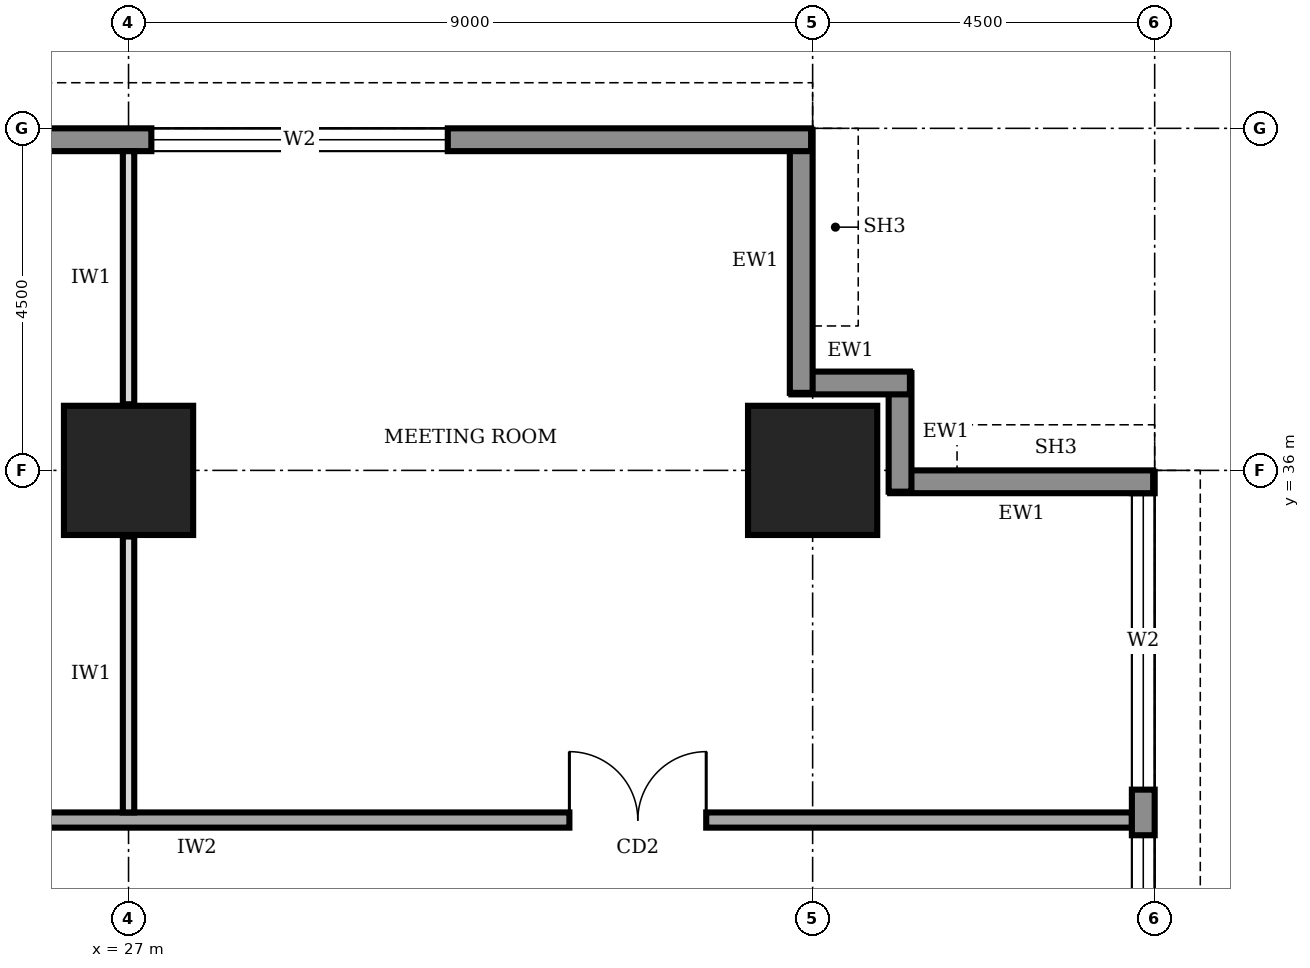
"""IFC4 building model, lengths in metres.
Left out: names, types, materials, properties, quantities, classifications, styles, units other than length and angle.
Written with IfcOpenShell. Run it as: python <this file> out.ifc"""

import sys

from ifc_helpers import new_model, si_unit, direction, frame, frame_2d, origin, origin_2d, place, context, subcontext, project, spatial, rectangle, extrude, element, fill, save


model = new_model("IFC4")
c1 = context("Model", 3, precision=1e-05, world=origin(), true_north=direction((0.0, 1.0)))
c2 = subcontext(c1, "Body", "Model", "MODEL_VIEW")
j1 = project(units=[si_unit("LENGTHUNIT", "METRE"), si_unit("PLANEANGLEUNIT", "RADIAN")], contexts=[c1])
p1 = place(None, origin())
s1 = spatial("IfcSite", under=j1, at=p1, CompositionType="ELEMENT")
p2 = place(p1, origin())
s2 = spatial("IfcBuilding", under=s1, at=p2, CompositionType="ELEMENT")
p3 = place(p2, frame((0.0, 0.0, 145.0)))
s3 = spatial("IfcBuildingStorey", under=s2, at=p3, CompositionType="ELEMENT", Elevation=145.0)
for number, where, z_axis, x_axis in (
    (1, (27.0, 36.0, 0.0), (0.0, 0.0, 1.0), (1.0, 0.0, 0.0)),
    (2, (36.0, 36.0, 0.0), (0.0, 0.0, 1.0), (1.0, 0.0, 0.0)),
):
    element("IfcColumn", number, at=place(p3, frame(where, z_axis=z_axis, x_axis=x_axis)), inside=s3, PredefinedType="COLUMN", context=c2, shape_type="SweptSolid", body=[
        extrude(rectangle(XDim=1.7, YDim=1.7, at=origin_2d()), origin(), (0.0, 0.0, 1.0), 4.0),
    ])
p4 = place(p3, frame((40.35, 4.52, 0.0), z_axis=(0.0, 0.0, 1.0), x_axis=(0.0, 1.0, 0.0)))
e3 = element("IfcWall", 3, at=p4, inside=s3, PredefinedType="STANDARD", context=c2, shape_type="SweptSolid", body=[
    extrude(rectangle(XDim=31.46, YDim=0.3, at=frame_2d((15.73, 0.0))), origin(), (0.0, 0.0, 1.0), 3.75),
])
p5 = place(p4, frame((4.78, 0.0, 0.6)))
e4 = element("IfcOpeningElement", 4, at=p5, cuts=e3, PredefinedType="OPENING", context=c2, shape_type="SweptSolid", body=[
    extrude(rectangle(XDim=3.9, YDim=2.6, at=frame_2d((1.95, 1.3))), frame((0.0, 0.16, 0.0), z_axis=(0.0, -1.0, 0.0), x_axis=(1.0, 0.0, 0.0)), (0.0, 0.0, 1.0), 0.32),
])
p6 = place(p4, frame((9.28, 0.0, 0.6)))
e5 = element("IfcOpeningElement", 5, at=p6, cuts=e3, PredefinedType="OPENING", context=c2, shape_type="SweptSolid", body=[
    extrude(rectangle(XDim=3.9, YDim=2.6, at=frame_2d((1.95, 1.3))), frame((0.0, 0.16, 0.0), z_axis=(0.0, -1.0, 0.0), x_axis=(1.0, 0.0, 0.0)), (0.0, 0.0, 1.0), 0.32),
])
p7 = place(p4, frame((13.78, 0.0, 0.6)))
e6 = element("IfcOpeningElement", 6, at=p7, cuts=e3, PredefinedType="OPENING", context=c2, shape_type="SweptSolid", body=[
    extrude(rectangle(XDim=3.9, YDim=2.6, at=frame_2d((1.95, 1.3))), frame((0.0, 0.16, 0.0), z_axis=(0.0, -1.0, 0.0), x_axis=(1.0, 0.0, 0.0)), (0.0, 0.0, 1.0), 0.32),
])
p8 = place(p4, frame((18.28, 0.0, 0.6)))
e7 = element("IfcOpeningElement", 7, at=p8, cuts=e3, PredefinedType="OPENING", context=c2, shape_type="SweptSolid", body=[
    extrude(rectangle(XDim=3.9, YDim=2.6, at=frame_2d((1.95, 1.3))), frame((0.0, 0.16, 0.0), z_axis=(0.0, -1.0, 0.0), x_axis=(1.0, 0.0, 0.0)), (0.0, 0.0, 1.0), 0.32),
])
p9 = place(p4, frame((22.78, 0.0, 0.6)))
e8 = element("IfcOpeningElement", 8, at=p9, cuts=e3, PredefinedType="OPENING", context=c2, shape_type="SweptSolid", body=[
    extrude(rectangle(XDim=3.9, YDim=2.6, at=frame_2d((1.95, 1.3))), frame((0.0, 0.16, 0.0), z_axis=(0.0, -1.0, 0.0), x_axis=(1.0, 0.0, 0.0)), (0.0, 0.0, 1.0), 0.32),
])
p10 = place(p4, frame((27.28, 0.0, 0.6)))
e9 = element("IfcOpeningElement", 9, at=p10, cuts=e3, PredefinedType="OPENING", context=c2, shape_type="SweptSolid", body=[
    extrude(rectangle(XDim=3.9, YDim=2.6, at=frame_2d((1.95, 1.3))), frame((0.0, 0.16, 0.0), z_axis=(0.0, -1.0, 0.0), x_axis=(1.0, 0.0, 0.0)), (0.0, 0.0, 1.0), 0.32),
])
p11 = place(p3, frame((40.48, 35.85, 0.0), z_axis=(0.0, 0.0, 1.0), x_axis=(-1.0, 0.0, 0.0)))
e10 = element("IfcWall", 10, at=p11, inside=s3, PredefinedType="STANDARD", context=c2, shape_type="SweptSolid", body=[
    extrude(rectangle(XDim=3.46, YDim=0.3, at=frame_2d((1.73, 0.0))), origin(), (0.0, 0.0, 1.0), 2.85),
])
for number, where, z_axis, x_axis in (
    (11, (37.15, 35.72, 0.0), (0.0, 0.0, 1.0), (0.0, 1.0, 0.0)),
    (12, (37.28, 37.15, 0.0), (0.0, 0.0, 1.0), (-1.0, 0.0, 0.0)),
):
    element("IfcWall", number, at=place(p3, frame(where, z_axis=z_axis, x_axis=x_axis)), inside=s3, PredefinedType="STANDARD", context=c2, shape_type="SweptSolid", body=[
        extrude(rectangle(XDim=1.56, YDim=0.3, at=frame_2d((0.78, 0.0))), origin(), (0.0, 0.0, 1.0), 3.75),
    ])
p12 = place(p3, frame((35.85, 37.02, 0.0), z_axis=(0.0, 0.0, 1.0), x_axis=(0.0, 1.0, 0.0)))
e13 = element("IfcWall", 13, at=p12, inside=s3, PredefinedType="STANDARD", context=c2, shape_type="SweptSolid", body=[
    extrude(rectangle(XDim=3.46, YDim=0.3, at=frame_2d((1.73, 0.0))), origin(), (0.0, 0.0, 1.0), 2.85),
])
p13 = place(p3, frame((35.98, 40.35, 0.0), z_axis=(0.0, 0.0, 1.0), x_axis=(-1.0, 0.0, 0.0)))
e14 = element("IfcWall", 14, at=p13, inside=s3, PredefinedType="STANDARD", context=c2, shape_type="SweptSolid", body=[
    extrude(rectangle(XDim=31.46, YDim=0.3, at=frame_2d((15.73, 0.0))), origin(), (0.0, 0.0, 1.0), 3.75),
])
p14 = place(p13, frame((27.28, 0.0, 0.6)))
e15 = element("IfcOpeningElement", 15, at=p14, cuts=e14, PredefinedType="OPENING", context=c2, shape_type="SweptSolid", body=[
    extrude(rectangle(XDim=3.9, YDim=2.6, at=frame_2d((1.95, 1.3))), frame((0.0, 0.16, 0.0), z_axis=(0.0, -1.0, 0.0), x_axis=(1.0, 0.0, 0.0)), (0.0, 0.0, 1.0), 0.32),
])
p15 = place(p13, frame((22.78, 0.0, 0.6)))
e16 = element("IfcOpeningElement", 16, at=p15, cuts=e14, PredefinedType="OPENING", context=c2, shape_type="SweptSolid", body=[
    extrude(rectangle(XDim=3.9, YDim=2.6, at=frame_2d((1.95, 1.3))), frame((0.0, 0.16, 0.0), z_axis=(0.0, -1.0, 0.0), x_axis=(1.0, 0.0, 0.0)), (0.0, 0.0, 1.0), 0.32),
])
p16 = place(p13, frame((4.78, 0.0, 0.6)))
e17 = element("IfcOpeningElement", 17, at=p16, cuts=e14, PredefinedType="OPENING", context=c2, shape_type="SweptSolid", body=[
    extrude(rectangle(XDim=3.9, YDim=2.6, at=frame_2d((1.95, 1.3))), frame((0.0, 0.16, 0.0), z_axis=(0.0, -1.0, 0.0), x_axis=(1.0, 0.0, 0.0)), (0.0, 0.0, 1.0), 0.32),
])
p17 = place(p3, frame((40.2, 31.4, 0.0), z_axis=(0.0, 0.0, 1.0), x_axis=(-1.0, 0.0, 0.0)))
e18 = element("IfcWall", 18, at=p17, inside=s3, PredefinedType="SOLIDWALL", context=c2, shape_type="SweptSolid", body=[
    extrude(rectangle(XDim=28.5, YDim=0.2, at=frame_2d((14.25, 0.0))), origin(), (0.0, 0.0, 1.0), 3.75),
])
p18 = place(p17, frame((27.2, 0.0, 0.0)))
e19 = element("IfcOpeningElement", 19, at=p18, cuts=e18, PredefinedType="OPENING", context=c2, shape_type="SweptSolid", body=[
    extrude(rectangle(XDim=1.0, YDim=2.1, at=frame_2d((0.5, 1.05))), frame((0.0, 0.11, 0.0), z_axis=(0.0, -1.0, 0.0), x_axis=(1.0, 0.0, 0.0)), (0.0, 0.0, 1.0), 0.22),
])
p19 = place(p17, frame((23.95, 0.0, 0.0)))
e20 = element("IfcOpeningElement", 20, at=p19, cuts=e18, PredefinedType="OPENING", context=c2, shape_type="SweptSolid", body=[
    extrude(rectangle(XDim=1.0, YDim=2.1, at=frame_2d((0.5, 1.05))), frame((0.0, 0.11, 0.0), z_axis=(0.0, -1.0, 0.0), x_axis=(1.0, 0.0, 0.0)), (0.0, 0.0, 1.0), 0.22),
])
p20 = place(p17, frame((17.2, 0.0, 0.0)))
e21 = element("IfcOpeningElement", 21, at=p20, cuts=e18, PredefinedType="OPENING", context=c2, shape_type="SweptSolid", body=[
    extrude(rectangle(XDim=1.0, YDim=2.1, at=frame_2d((0.5, 1.05))), frame((0.0, 0.11, 0.0), z_axis=(0.0, -1.0, 0.0), x_axis=(1.0, 0.0, 0.0)), (0.0, 0.0, 1.0), 0.22),
])
p21 = place(p17, frame((5.6, 0.0, 0.0)))
e22 = element("IfcOpeningElement", 22, at=p21, cuts=e18, PredefinedType="OPENING", context=c2, shape_type="SweptSolid", body=[
    extrude(rectangle(XDim=1.8, YDim=2.1, at=frame_2d((0.9, 1.05))), frame((0.0, 0.11, 0.0), z_axis=(0.0, -1.0, 0.0), x_axis=(1.0, 0.0, 0.0)), (0.0, 0.0, 1.0), 0.22),
])
p22 = place(p3, frame((27.0, 31.5, 0.0), z_axis=(0.0, 0.0, 1.0), x_axis=(0.0, 1.0, 0.0)))
e23 = element("IfcWall", 23, at=p22, inside=s3, PredefinedType="PARTITIONING", context=c2, shape_type="SweptSolid", body=[
    extrude(rectangle(XDim=3.63, YDim=0.15, at=frame_2d((1.815, 0.0))), origin(), (0.0, 0.0, 1.0), 2.85),
])
p23 = place(p3, frame((27.0, 36.87, 0.0), z_axis=(0.0, 0.0, 1.0), x_axis=(0.0, 1.0, 0.0)))
e24 = element("IfcWall", 24, at=p23, inside=s3, PredefinedType="PARTITIONING", context=c2, shape_type="SweptSolid", body=[
    extrude(rectangle(XDim=3.33, YDim=0.15, at=frame_2d((1.665, 0.0))), origin(), (0.0, 0.0, 1.0), 2.85),
])
p24 = place(p9, origin())
e25 = element("IfcWindow", 25, at=p24, inside=s3, PartitioningType="SINGLE_PANEL", PredefinedType="WINDOW", context=c2, shape_type="SweptSolid", body=[
    extrude(rectangle(XDim=3.9, YDim=2.6, at=frame_2d((1.95, 1.3))), frame((0.0, 0.03, 0.0), z_axis=(0.0, -1.0, 0.0), x_axis=(1.0, 0.0, 0.0)), (0.0, 0.0, 1.0), 0.06),
])
fill(e8, e25)
p25 = place(p10, origin())
e26 = element("IfcWindow", 26, at=p25, inside=s3, PartitioningType="SINGLE_PANEL", PredefinedType="WINDOW", context=c2, shape_type="SweptSolid", body=[
    extrude(rectangle(XDim=3.9, YDim=2.6, at=frame_2d((1.95, 1.3))), frame((0.0, 0.03, 0.0), z_axis=(0.0, -1.0, 0.0), x_axis=(1.0, 0.0, 0.0)), (0.0, 0.0, 1.0), 0.06),
])
fill(e9, e26)
p26 = place(p16, origin())
e27 = element("IfcWindow", 27, at=p26, inside=s3, PartitioningType="SINGLE_PANEL", PredefinedType="WINDOW", context=c2, shape_type="SweptSolid", body=[
    extrude(rectangle(XDim=3.9, YDim=2.6, at=frame_2d((1.95, 1.3))), frame((0.0, 0.03, 0.0), z_axis=(0.0, -1.0, 0.0), x_axis=(1.0, 0.0, 0.0)), (0.0, 0.0, 1.0), 0.06),
])
fill(e17, e27)
p27 = place(p21, frame((1.8, 0.0, 0.0), z_axis=(0.0, 0.0, 1.0), x_axis=(-1.0, 0.0, 0.0)))
e28 = element("IfcDoor", 28, at=p27, inside=s3, OperationType="DOUBLE_DOOR_SINGLE_SWING", PredefinedType="DOOR", context=c2, shape_type="SweptSolid", body=[
    extrude(rectangle(XDim=1.8, YDim=2.1, at=frame_2d((0.9, 1.05))), frame((0.0, 0.025, 0.0), z_axis=(0.0, -1.0, 0.0), x_axis=(1.0, 0.0, 0.0)), (0.0, 0.0, 1.0), 0.05),
])
fill(e22, e28)
save(model, sys.argv[1])
